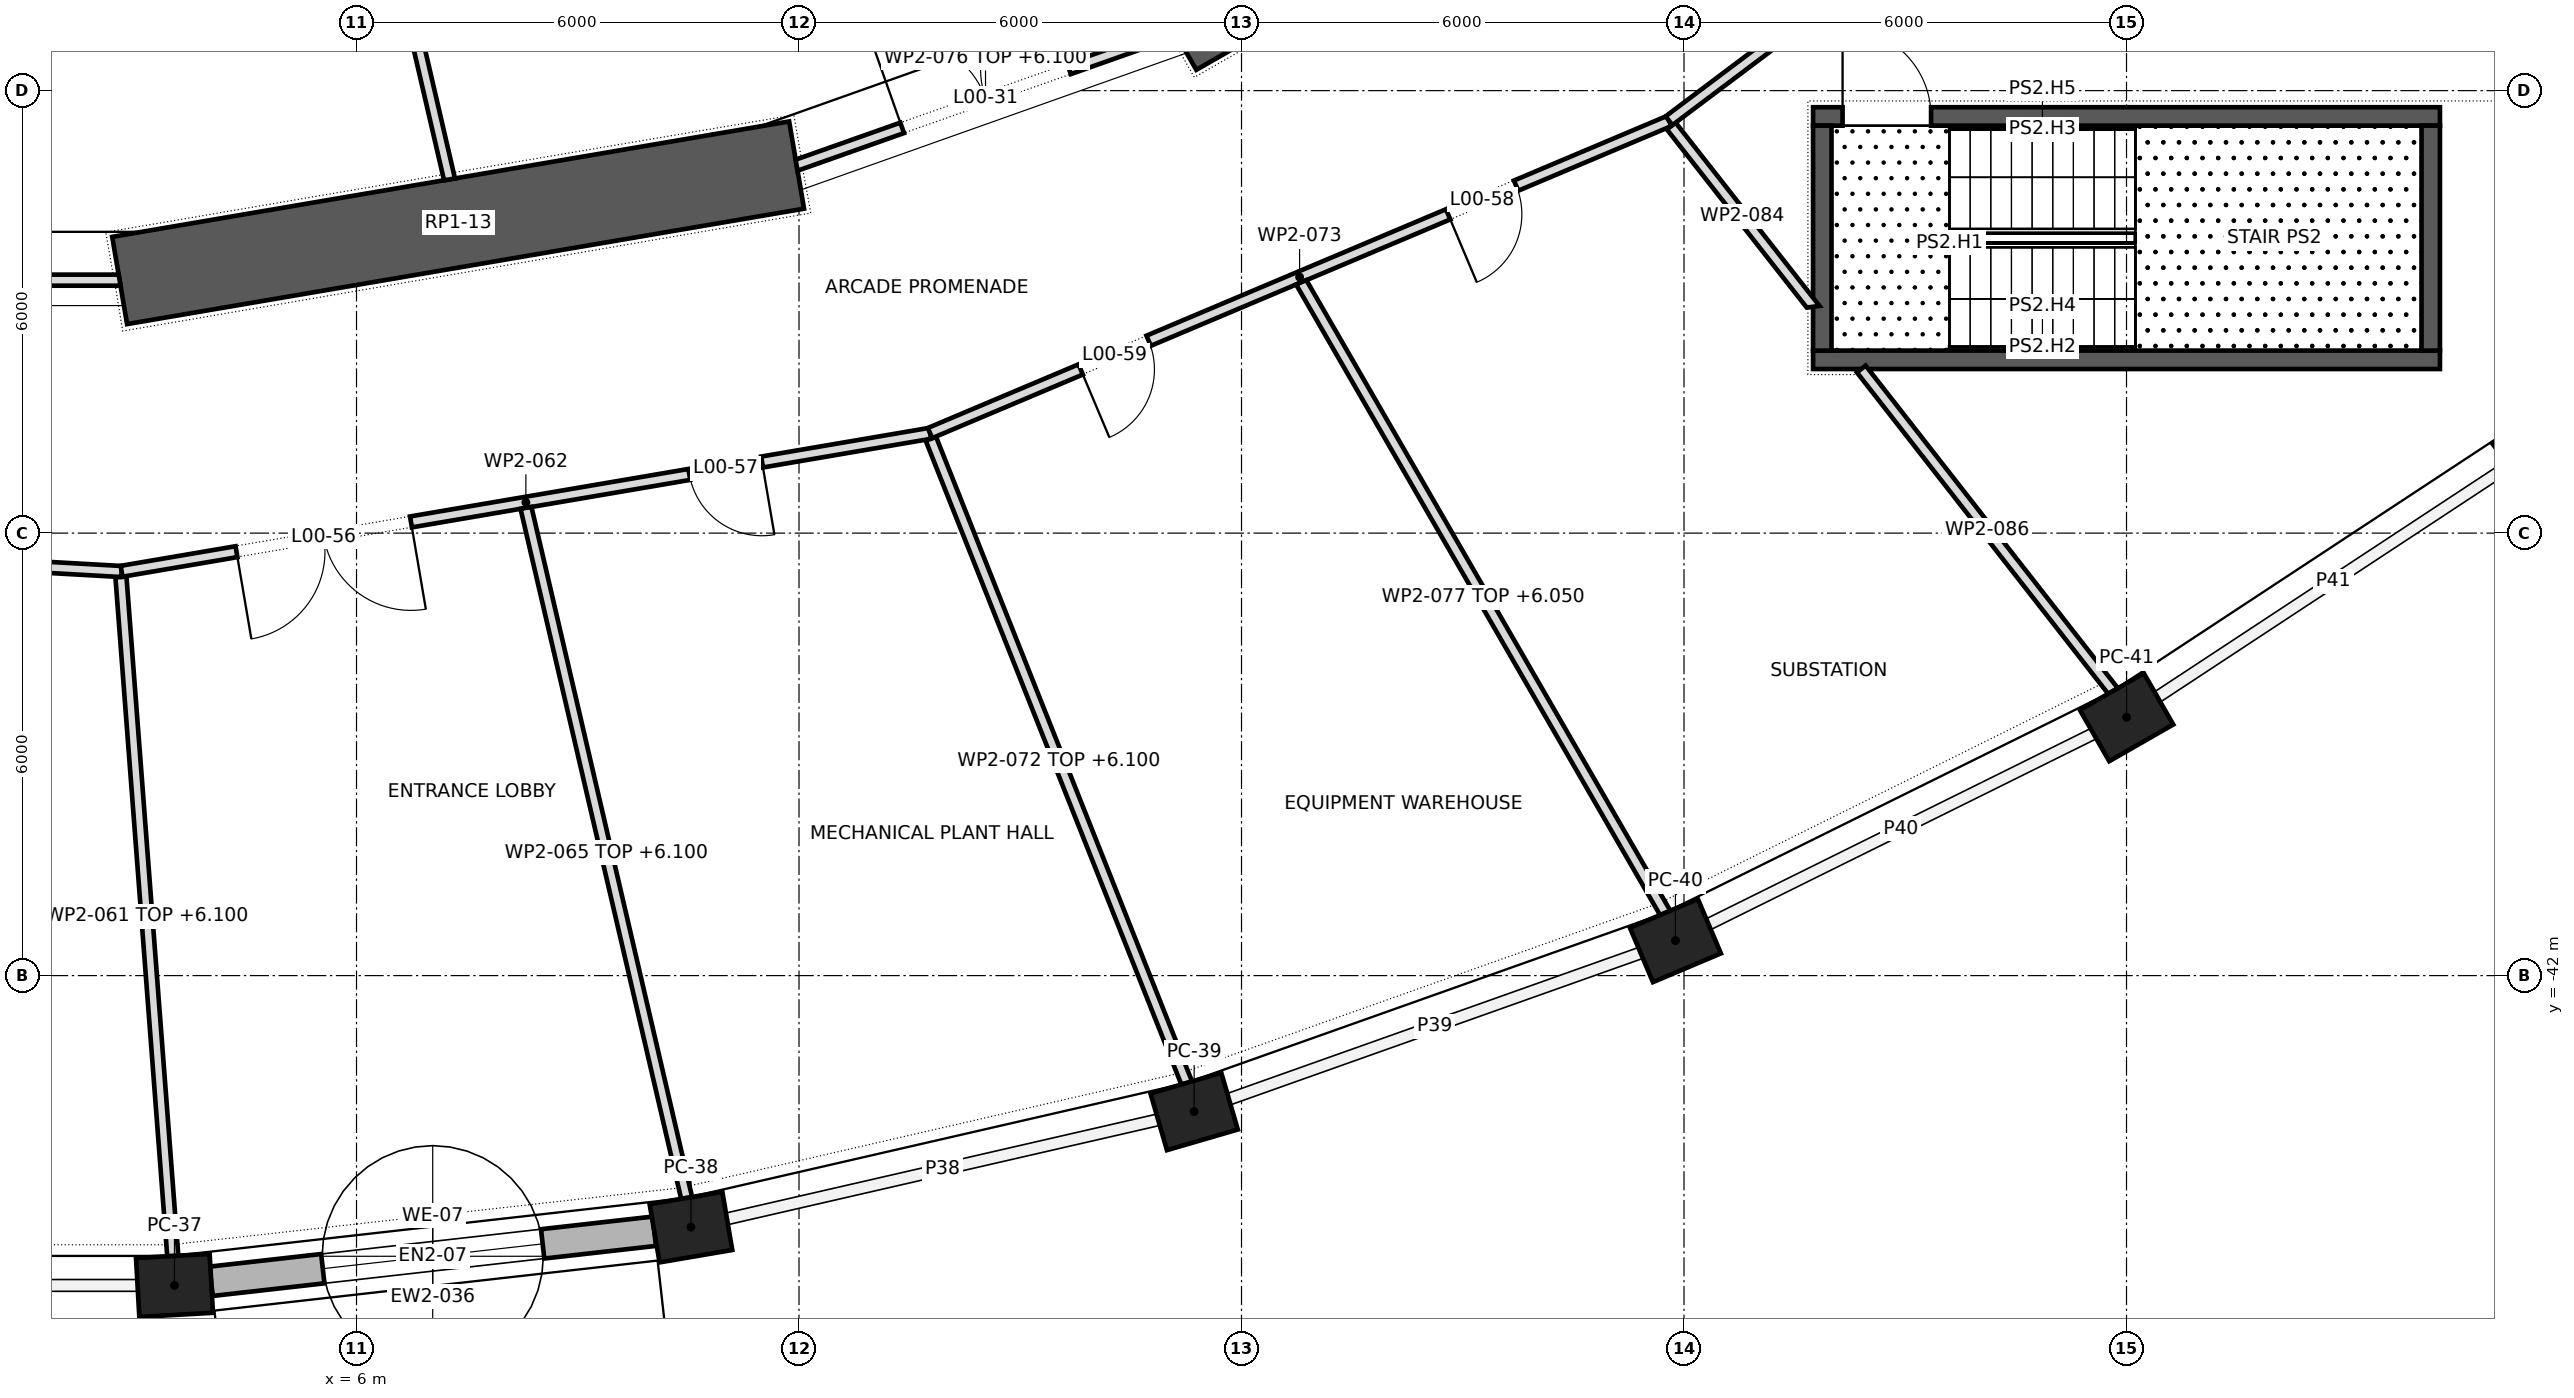
"""IFC4 building model, lengths in metres.
Left out: names, types, materials, properties, quantities, classifications, styles, units other than length and angle.
Written with IfcOpenShell. Run it as: python <this file> out.ifc"""

import sys

from ifc_helpers import new_model, si_unit, direction, frame, frame_2d, origin, origin_2d, place, context, subcontext, project, spatial, polyline, rectangle, outline, extrude, element, fill, save


model = new_model("IFC4")
c1 = context("Model", 3, precision=1e-05, world=origin(), true_north=direction((0.0, 1.0)))
c2 = subcontext(c1, "Body", "Model", "MODEL_VIEW")
j1 = project(units=[si_unit("LENGTHUNIT", "METRE"), si_unit("PLANEANGLEUNIT", "RADIAN")], contexts=[c1])
p1 = place(None, origin())
s1 = spatial("IfcSite", under=j1, at=p1, CompositionType="ELEMENT")
p2 = place(p1, origin())
s2 = spatial("IfcBuilding", under=s1, at=p2, CompositionType="ELEMENT")
p3 = place(p2, origin())
s3 = spatial("IfcBuildingStorey", under=s2, at=p3, CompositionType="ELEMENT", Elevation=0.0)
for number, where, z_axis, x_axis in (
    (1, (3.532, -46.201, 0.0), (0.0, 0.0, 1.0), (0.998, 0.056, 0.0)),
    (2, (10.535, -45.41, 0.0), (0.0, 0.0, 1.0), (0.986, 0.168, 0.0)),
    (3, (17.358, -43.843, 0.0), (0.0, 0.0, 1.0), (0.96, 0.279, 0.0)),
    (4, (23.884, -41.525, 0.0), (0.0, 0.0, 1.0), (0.921, 0.389, 0.0)),
    (5, (30.001, -38.497, 0.0), (0.0, 0.0, 1.0), (0.868, 0.497, 0.0)),
    (6, (35.605, -34.81, 0.0), (0.0, 0.0, 1.0), (0.799, 0.601, 0.0)),
):
    element("IfcColumn", number, at=place(p3, frame(where, z_axis=z_axis, x_axis=x_axis)), inside=s3, PredefinedType="COLUMN", context=c2, shape_type="SweptSolid", body=[
        extrude(rectangle(XDim=1.0, YDim=0.8, at=origin_2d()), origin(), (0.0, 0.0, 1.0), 7.0),
    ])
p4 = place(p3, frame((2.788, -32.574, 0.0), z_axis=(0.0, 0.0, 1.0), x_axis=(0.985776286846, 0.168062822456, 0.0)))
e7 = element("IfcWall", 7, at=p4, inside=s3, PredefinedType="SHEAR", context=c2, shape_type="SweptSolid", body=[
    extrude(rectangle(XDim=9.312, YDim=1.2, at=frame_2d((4.656, 0.0))), origin(), (0.0, 0.0, 1.0), 7.0),
])
p5 = place(p3, frame((17.089, -29.198, 0.0), z_axis=(0.0, 0.0, 1.0), x_axis=(0.867760656864, 0.496982336103, 0.0)))
e8 = element("IfcWall", 8, at=p5, inside=s3, PredefinedType="SHEAR", context=c2, shape_type="SweptSolid", body=[
    extrude(rectangle(XDim=9.038, YDim=1.2, at=frame_2d((4.519, 0.0))), origin(), (0.0, 0.0, 1.0), 7.0),
])
p6 = place(p3, frame((4.029, -46.145, 0.0), z_axis=(0.0, 0.0, 1.0), x_axis=(0.993691731831, 0.112146074793, 0.0)))
e9 = element("IfcWall", 9, at=p6, inside=s3, PredefinedType="STANDARD", context=c2, shape_type="SweptSolid", body=[
    extrude(rectangle(XDim=6.048, YDim=0.4, at=frame_2d((3.024, 0.0))), origin(), (0.0, 0.0, 1.0), 6.2),
])
p7 = place(p6, frame((1.524, 0.0, 0.0)))
e10 = element("IfcOpeningElement", 10, at=p7, cuts=e9, PredefinedType="OPENING", context=c2, shape_type="SweptSolid", body=[
    extrude(rectangle(XDim=3.0, YDim=3.0, at=frame_2d((1.5, 1.5))), frame((0.0, 0.212, 0.0), z_axis=(0.0, -1.0, 0.0), x_axis=(1.0, 0.0, 0.0)), (0.0, 0.0, 1.0), 0.424),
])
p8 = place(p6, frame((1.524, 0.0, 3.45)))
e11 = element("IfcOpeningElement", 11, at=p8, cuts=e9, PredefinedType="OPENING", context=c2, shape_type="SweptSolid", body=[
    extrude(rectangle(XDim=3.0, YDim=2.25, at=frame_2d((1.5, 1.125))), frame((0.0, 0.212, 0.0), z_axis=(0.0, -1.0, 0.0), x_axis=(1.0, 0.0, 0.0)), (0.0, 0.0, 1.0), 0.424),
])
p9 = place(p3, frame((25.75, -30.35, 0.0), z_axis=(0.0, 0.0, 1.0), x_axis=(1.0, 0.0, 0.0)))
e12 = element("IfcWall", 12, at=p9, inside=s3, PredefinedType="SHEAR", context=c2, shape_type="SweptSolid", body=[
    extrude(rectangle(XDim=8.5, YDim=0.25, at=frame_2d((4.25, 0.0))), origin(), (0.0, 0.0, 1.0), 6.65),
])
p10 = place(p9, frame((0.4, 0.0, 0.0)))
e13 = element("IfcOpeningElement", 13, at=p10, cuts=e12, PredefinedType="OPENING", context=c2, shape_type="SweptSolid", body=[
    extrude(rectangle(XDim=1.2, YDim=2.1, at=frame_2d((0.6, 1.05))), frame((0.0, 0.137, 0.0), z_axis=(0.0, -1.0, 0.0), x_axis=(1.0, 0.0, 0.0)), (0.0, 0.0, 1.0), 0.274),
])
p11 = place(p3, frame((25.75, -33.65, 0.0), z_axis=(0.0, 0.0, 1.0), x_axis=(1.0, 0.0, 0.0)))
e14 = element("IfcWall", 14, at=p11, inside=s3, PredefinedType="SHEAR", context=c2, shape_type="SweptSolid", body=[
    extrude(rectangle(XDim=8.5, YDim=0.25, at=frame_2d((4.25, 0.0))), origin(), (0.0, 0.0, 1.0), 6.65),
])
for number, where, z_axis, x_axis in (
    (15, (25.875, -33.525, 0.0), (0.0, 0.0, 1.0), (0.0, 1.0, 0.0)),
    (16, (34.125, -33.525, 0.0), (0.0, 0.0, 1.0), (0.0, 1.0, 0.0)),
):
    element("IfcWall", number, at=place(p3, frame(where, z_axis=z_axis, x_axis=x_axis)), inside=s3, PredefinedType="SHEAR", context=c2, shape_type="SweptSolid", body=[
        extrude(rectangle(XDim=3.05, YDim=0.25, at=frame_2d((1.525, 0.0))), origin(), (0.0, 0.0, 1.0), 6.65),
    ])
p12 = place(p3, frame((2.788, -32.57, 0.0), z_axis=(0.0, 0.0, 1.0), x_axis=(-1.0, 0.0, 0.0)))
e17 = element("IfcWall", 17, at=p12, inside=s3, PredefinedType="PARTITIONING", context=c2, shape_type="SweptSolid", body=[
    extrude(outline(polyline([(0.013, -0.075), (5.563, -0.075), (5.589, 0.075), (-0.013, 0.075), (0.013, -0.075)])), origin(), (0.0, 0.0, 1.0), 6.1),
])
p13 = place(p12, frame((1.588, 0.0, 0.0)))
e18 = element("IfcOpeningElement", 18, at=p13, cuts=e17, PredefinedType="OPENING", context=c2, shape_type="SweptSolid", body=[
    extrude(rectangle(XDim=2.4, YDim=2.1, at=frame_2d((1.2, 1.05))), frame((0.0, 0.087, 0.0), z_axis=(0.0, -1.0, 0.0), x_axis=(1.0, 0.0, 0.0)), (0.0, 0.0, 1.0), 0.174),
])
p14 = place(p3, frame((2.816, -36.521, 0.0), z_axis=(0.0, 0.0, 1.0), x_axis=(-0.998407170401, 0.056419164225, 0.0)))
e19 = element("IfcWall", 19, at=p14, inside=s3, PredefinedType="PARTITIONING", context=c2, shape_type="SweptSolid", body=[
    extrude(rectangle(XDim=11.169, YDim=0.15, at=frame_2d((5.584, 0.0))), origin(), (0.0, 0.0, 1.0), 6.65),
])
p15 = place(p14, frame((5.1, 0.0, 0.0)))
e20 = element("IfcOpeningElement", 20, at=p15, cuts=e19, PredefinedType="OPENING", context=c2, shape_type="SweptSolid", body=[
    extrude(rectangle(XDim=1.0, YDim=2.1, at=frame_2d((0.5, 1.05))), frame((0.0, 0.087, 0.0), z_axis=(0.0, -1.0, 0.0), x_axis=(1.0, 0.0, 0.0)), (0.0, 0.0, 1.0), 0.174),
])
p16 = place(p3, frame((2.806, -36.595, 0.0), z_axis=(0.0, 0.0, 1.0), x_axis=(0.076140518104, -0.997097097329, 0.0)))
e21 = element("IfcWall", 21, at=p16, inside=s3, PredefinedType="PARTITIONING", context=c2, shape_type="SweptSolid", body=[
    extrude(outline(polyline([(0.0, -0.075), (9.233, -0.075), (9.236, 0.075), (0.0, 0.075), (0.0, -0.075)])), origin(), (0.0, 0.0, 1.0), 6.1),
])
p17 = place(p3, frame((2.815, -36.518, 0.0), z_axis=(0.0, 0.0, 1.0), x_axis=(0.9857548052, 0.168188774967, 0.0)))
e22 = element("IfcWall", 22, at=p17, inside=s3, PredefinedType="PARTITIONING", context=c2, shape_type="SweptSolid", body=[
    extrude(rectangle(XDim=11.122, YDim=0.15, at=frame_2d((5.561, 0.0))), origin(), (0.0, 0.0, 1.0), 6.65),
])
p18 = place(p17, frame((1.58, 0.0, 0.0)))
e23 = element("IfcOpeningElement", 23, at=p18, cuts=e22, PredefinedType="OPENING", context=c2, shape_type="SweptSolid", body=[
    extrude(rectangle(XDim=2.4, YDim=2.1, at=frame_2d((1.2, 1.05))), frame((0.0, 0.087, 0.0), z_axis=(0.0, -1.0, 0.0), x_axis=(1.0, 0.0, 0.0)), (0.0, 0.0, 1.0), 0.174),
])
p19 = place(p17, frame((7.809, 0.0, 0.0)))
e24 = element("IfcOpeningElement", 24, at=p19, cuts=e22, PredefinedType="OPENING", context=c2, shape_type="SweptSolid", body=[
    extrude(rectangle(XDim=1.0, YDim=2.1, at=frame_2d((0.5, 1.05))), frame((0.0, 0.087, 0.0), z_axis=(0.0, -1.0, 0.0), x_axis=(1.0, 0.0, 0.0)), (0.0, 0.0, 1.0), 0.174),
])
p20 = place(p3, frame((5.607, -24.074, 0.0), z_axis=(0.0, 0.0, 1.0), x_axis=(0.225955625045, -0.974137595779, 0.0)))
e25 = element("IfcWall", 25, at=p20, inside=s3, PredefinedType="PARTITIONING", context=c2, shape_type="SweptSolid", body=[
    extrude(outline(polyline([(-0.017, -0.075), (7.315, -0.075), (7.323, 0.075), (0.017, 0.075), (-0.017, -0.075)])), origin(), (0.0, 0.0, 1.0), 6.65),
])
p21 = place(p3, frame((8.298, -35.657, 0.0), z_axis=(0.0, 0.0, 1.0), x_axis=(0.226707460947, -0.973962898241, 0.0)))
e26 = element("IfcWall", 26, at=p21, inside=s3, PredefinedType="PARTITIONING", context=c2, shape_type="SweptSolid", body=[
    extrude(outline(polyline([(-0.004, -0.075), (9.604, -0.075), (9.613, 0.075), (0.004, 0.075), (-0.004, -0.075)])), origin(), (0.0, 0.0, 1.0), 6.1),
])
p22 = place(p3, frame((13.788, -34.721, 0.0), z_axis=(0.0, 0.0, 1.0), x_axis=(0.3690741926, -0.929399935634, 0.0)))
e27 = element("IfcWall", 27, at=p22, inside=s3, PredefinedType="PARTITIONING", context=c2, shape_type="SweptSolid", body=[
    extrude(outline(polyline([(0.0, -0.075), (9.392, -0.075), (9.406, 0.075), (0.0, 0.075), (0.0, -0.075)])), origin(), (0.0, 0.0, 1.0), 6.1),
])
p23 = place(p3, frame((13.776, -34.643, 0.0), z_axis=(0.0, 0.0, 1.0), x_axis=(0.921269574612, 0.388924633951, 0.0)))
e28 = element("IfcWall", 28, at=p23, inside=s3, PredefinedType="PARTITIONING", context=c2, shape_type="SweptSolid", body=[
    extrude(rectangle(XDim=10.879, YDim=0.15, at=frame_2d((5.439, 0.0))), origin(), (0.0, 0.0, 1.0), 6.65),
])
p24 = place(p23, frame((7.626, 0.0, 0.0)))
e29 = element("IfcOpeningElement", 29, at=p24, cuts=e28, PredefinedType="OPENING", context=c2, shape_type="SweptSolid", body=[
    extrude(rectangle(XDim=1.0, YDim=2.1, at=frame_2d((0.5, 1.05))), frame((0.0, 0.087, 0.0), z_axis=(0.0, -1.0, 0.0), x_axis=(1.0, 0.0, 0.0)), (0.0, 0.0, 1.0), 0.174),
])
p25 = place(p23, frame((2.218, 0.0, 0.0)))
e30 = element("IfcOpeningElement", 30, at=p25, cuts=e28, PredefinedType="OPENING", context=c2, shape_type="SweptSolid", body=[
    extrude(rectangle(XDim=1.0, YDim=2.1, at=frame_2d((0.5, 1.05))), frame((0.0, 0.087, 0.0), z_axis=(0.0, -1.0, 0.0), x_axis=(1.0, 0.0, 0.0)), (0.0, 0.0, 1.0), 0.174),
])
p26 = place(p3, frame((17.091, -29.2, 0.0), z_axis=(0.0, 0.0, 1.0), x_axis=(-0.942814385805, -0.333318217204, 0.0)))
e31 = element("IfcWall", 31, at=p26, inside=s3, PredefinedType="PARTITIONING", context=c2, shape_type="SweptSolid", body=[
    extrude(outline(polyline([(0.014, -0.075), (5.422, -0.075), (5.448, 0.075), (-0.014, 0.075), (0.014, -0.075)])), origin(), (0.0, 0.0, 1.0), 6.1),
])
p27 = place(p26, frame((1.516, 0.0, 0.0)))
e32 = element("IfcOpeningElement", 32, at=p27, cuts=e31, PredefinedType="OPENING", context=c2, shape_type="SweptSolid", body=[
    extrude(rectangle(XDim=2.4, YDim=2.1, at=frame_2d((1.2, 1.05))), frame((0.0, 0.087, 0.0), z_axis=(0.0, -1.0, 0.0), x_axis=(1.0, 0.0, 0.0)), (0.0, 0.0, 1.0), 0.174),
])
p28 = place(p3, frame((18.81, -32.599, 0.0), z_axis=(0.0, 0.0, 1.0), x_axis=(0.499854452602, -0.866109419308, 0.0)))
e33 = element("IfcWall", 33, at=p28, inside=s3, PredefinedType="PARTITIONING", context=c2, shape_type="SweptSolid", body=[
    extrude(outline(polyline([(-0.009, -0.075), (9.864, -0.075), (9.883, 0.075), (0.009, 0.075), (-0.009, -0.075)])), origin(), (0.0, 0.0, 1.0), 6.05),
])
p29 = place(p3, frame((23.827, -30.48, 0.0), z_axis=(0.0, 0.0, 1.0), x_axis=(0.617357742076, -0.786682539719, 0.0)))
e34 = element("IfcWall", 34, at=p29, inside=s3, PredefinedType="PARTITIONING", context=c2, shape_type="SweptSolid", body=[
    extrude(outline(polyline([(0.0, -0.075), (3.071, -0.075), (3.161, 0.075), (0.0, 0.075), (0.0, -0.075)])), origin(), (0.0, 0.0, 1.0), 6.65),
])
p30 = place(p3, frame((26.403, -33.774, 0.0), z_axis=(0.0, 0.0, 1.0), x_axis=(0.615890158436, -0.787832033331, 0.0)))
e35 = element("IfcWall", 35, at=p30, inside=s3, PredefinedType="PARTITIONING", context=c2, shape_type="SweptSolid", body=[
    extrude(outline(polyline([(0.0, -0.075), (5.532, -0.075), (5.554, 0.075), (0.0, 0.075), (0.0, -0.075)])), origin(), (0.0, 0.0, 1.0), 6.65),
])
p31 = place(p3, frame((32.186, -24.098, 0.0), z_axis=(0.0, 0.0, 1.0), x_axis=(-0.799192758851, -0.601074815809, 0.0)))
e36 = element("IfcWall", 36, at=p31, inside=s3, PredefinedType="PARTITIONING", context=c2, shape_type="SweptSolid", body=[
    extrude(rectangle(XDim=10.498, YDim=0.15, at=frame_2d((5.249, 0.0))), origin(), (0.0, 0.0, 1.0), 6.65),
])
p32 = place(p31, frame((4.07, 0.0, 0.0)))
e37 = element("IfcOpeningElement", 37, at=p32, cuts=e36, PredefinedType="OPENING", context=c2, shape_type="SweptSolid", body=[
    extrude(rectangle(XDim=2.4, YDim=2.1, at=frame_2d((1.2, 1.05))), frame((0.0, 0.087, 0.0), z_axis=(0.0, -1.0, 0.0), x_axis=(1.0, 0.0, 0.0)), (0.0, 0.0, 1.0), 0.174),
])
p33 = place(p3, frame((32.227, -24.153, 0.0), z_axis=(0.0, 0.0, 1.0), x_axis=(0.800465305701, -0.599379090701, 0.0)))
e38 = element("IfcWall", 38, at=p33, inside=s3, PredefinedType="PARTITIONING", context=c2, shape_type="SweptSolid", body=[
    extrude(outline(polyline([(0.0, -0.075), (10.12, -0.075), (10.144, 0.075), (0.0, 0.075), (0.0, -0.075)])), origin(), (0.0, 0.0, 1.0), 6.05),
])
p34 = place(p7, frame((3.0, 0.0, 0.0), z_axis=(0.0, 0.0, 1.0), x_axis=(-1.0, 0.0, 0.0)))
e39 = element("IfcDoor", 39, at=p34, inside=s3, OperationType="REVOLVING", PredefinedType="DOOR", context=c2, shape_type="SweptSolid", body=[
    extrude(rectangle(XDim=3.0, YDim=3.0, at=frame_2d((1.5, 1.5))), frame((0.0, 0.025, 0.0), z_axis=(0.0, -1.0, 0.0), x_axis=(1.0, 0.0, 0.0)), (0.0, 0.0, 1.0), 0.05),
])
fill(e10, e39)
p35 = place(p8, origin())
e40 = element("IfcWindow", 40, at=p35, inside=s3, PartitioningType="DOUBLE_PANEL_VERTICAL", PredefinedType="WINDOW", context=c2, shape_type="SweptSolid", body=[
    extrude(rectangle(XDim=3.0, YDim=2.25, at=frame_2d((1.5, 1.125))), frame((0.0, 0.03, 0.0), z_axis=(0.0, -1.0, 0.0), x_axis=(1.0, 0.0, 0.0)), (0.0, 0.0, 1.0), 0.06),
])
fill(e11, e40)
p36 = place(p10, origin())
e41 = element("IfcDoor", 41, at=p36, inside=s3, OperationType="SINGLE_SWING_RIGHT", PredefinedType="DOOR", context=c2, shape_type="SweptSolid", body=[
    extrude(rectangle(XDim=1.2, YDim=2.1, at=frame_2d((0.6, 1.05))), frame((0.0, 0.025, 0.0), z_axis=(0.0, -1.0, 0.0), x_axis=(1.0, 0.0, 0.0)), (0.0, 0.0, 1.0), 0.05),
])
fill(e13, e41)
p37 = place(p27, frame((2.4, 0.0, 0.0), z_axis=(0.0, 0.0, 1.0), x_axis=(-1.0, 0.0, 0.0)))
e42 = element("IfcDoor", 42, at=p37, inside=s3, OperationType="DOUBLE_DOOR_SINGLE_SWING", PredefinedType="DOOR", context=c2, shape_type="SweptSolid", body=[
    extrude(rectangle(XDim=2.4, YDim=2.1, at=frame_2d((1.2, 1.05))), frame((0.0, 0.025, 0.0), z_axis=(0.0, -1.0, 0.0), x_axis=(1.0, 0.0, 0.0)), (0.0, 0.0, 1.0), 0.05),
])
fill(e32, e42)
p38 = place(p18, frame((2.4, 0.0, 0.0), z_axis=(0.0, 0.0, 1.0), x_axis=(-1.0, 0.0, 0.0)))
e43 = element("IfcDoor", 43, at=p38, inside=s3, OperationType="DOUBLE_DOOR_SINGLE_SWING", PredefinedType="DOOR", context=c2, shape_type="SweptSolid", body=[
    extrude(rectangle(XDim=2.4, YDim=2.1, at=frame_2d((1.2, 1.05))), frame((0.0, 0.025, 0.0), z_axis=(0.0, -1.0, 0.0), x_axis=(1.0, 0.0, 0.0)), (0.0, 0.0, 1.0), 0.05),
])
fill(e23, e43)
p39 = place(p19, frame((1.0, 0.0, 0.0), z_axis=(0.0, 0.0, 1.0), x_axis=(-1.0, 0.0, 0.0)))
e44 = element("IfcDoor", 44, at=p39, inside=s3, OperationType="SINGLE_SWING_RIGHT", PredefinedType="DOOR", context=c2, shape_type="SweptSolid", body=[
    extrude(rectangle(XDim=1.0, YDim=2.1, at=frame_2d((0.5, 1.05))), frame((0.0, 0.025, 0.0), z_axis=(0.0, -1.0, 0.0), x_axis=(1.0, 0.0, 0.0)), (0.0, 0.0, 1.0), 0.05),
])
fill(e24, e44)
p40 = place(p24, frame((1.0, 0.0, 0.0), z_axis=(0.0, 0.0, 1.0), x_axis=(-1.0, 0.0, 0.0)))
e45 = element("IfcDoor", 45, at=p40, inside=s3, OperationType="SINGLE_SWING_LEFT", PredefinedType="DOOR", context=c2, shape_type="SweptSolid", body=[
    extrude(rectangle(XDim=1.0, YDim=2.1, at=frame_2d((0.5, 1.05))), frame((0.0, 0.025, 0.0), z_axis=(0.0, -1.0, 0.0), x_axis=(1.0, 0.0, 0.0)), (0.0, 0.0, 1.0), 0.05),
])
fill(e29, e45)
p41 = place(p25, frame((1.0, 0.0, 0.0), z_axis=(0.0, 0.0, 1.0), x_axis=(-1.0, 0.0, 0.0)))
e46 = element("IfcDoor", 46, at=p41, inside=s3, OperationType="SINGLE_SWING_LEFT", PredefinedType="DOOR", context=c2, shape_type="SweptSolid", body=[
    extrude(rectangle(XDim=1.0, YDim=2.1, at=frame_2d((0.5, 1.05))), frame((0.0, 0.025, 0.0), z_axis=(0.0, -1.0, 0.0), x_axis=(1.0, 0.0, 0.0)), (0.0, 0.0, 1.0), 0.05),
])
fill(e30, e46)
save(model, sys.argv[1])
